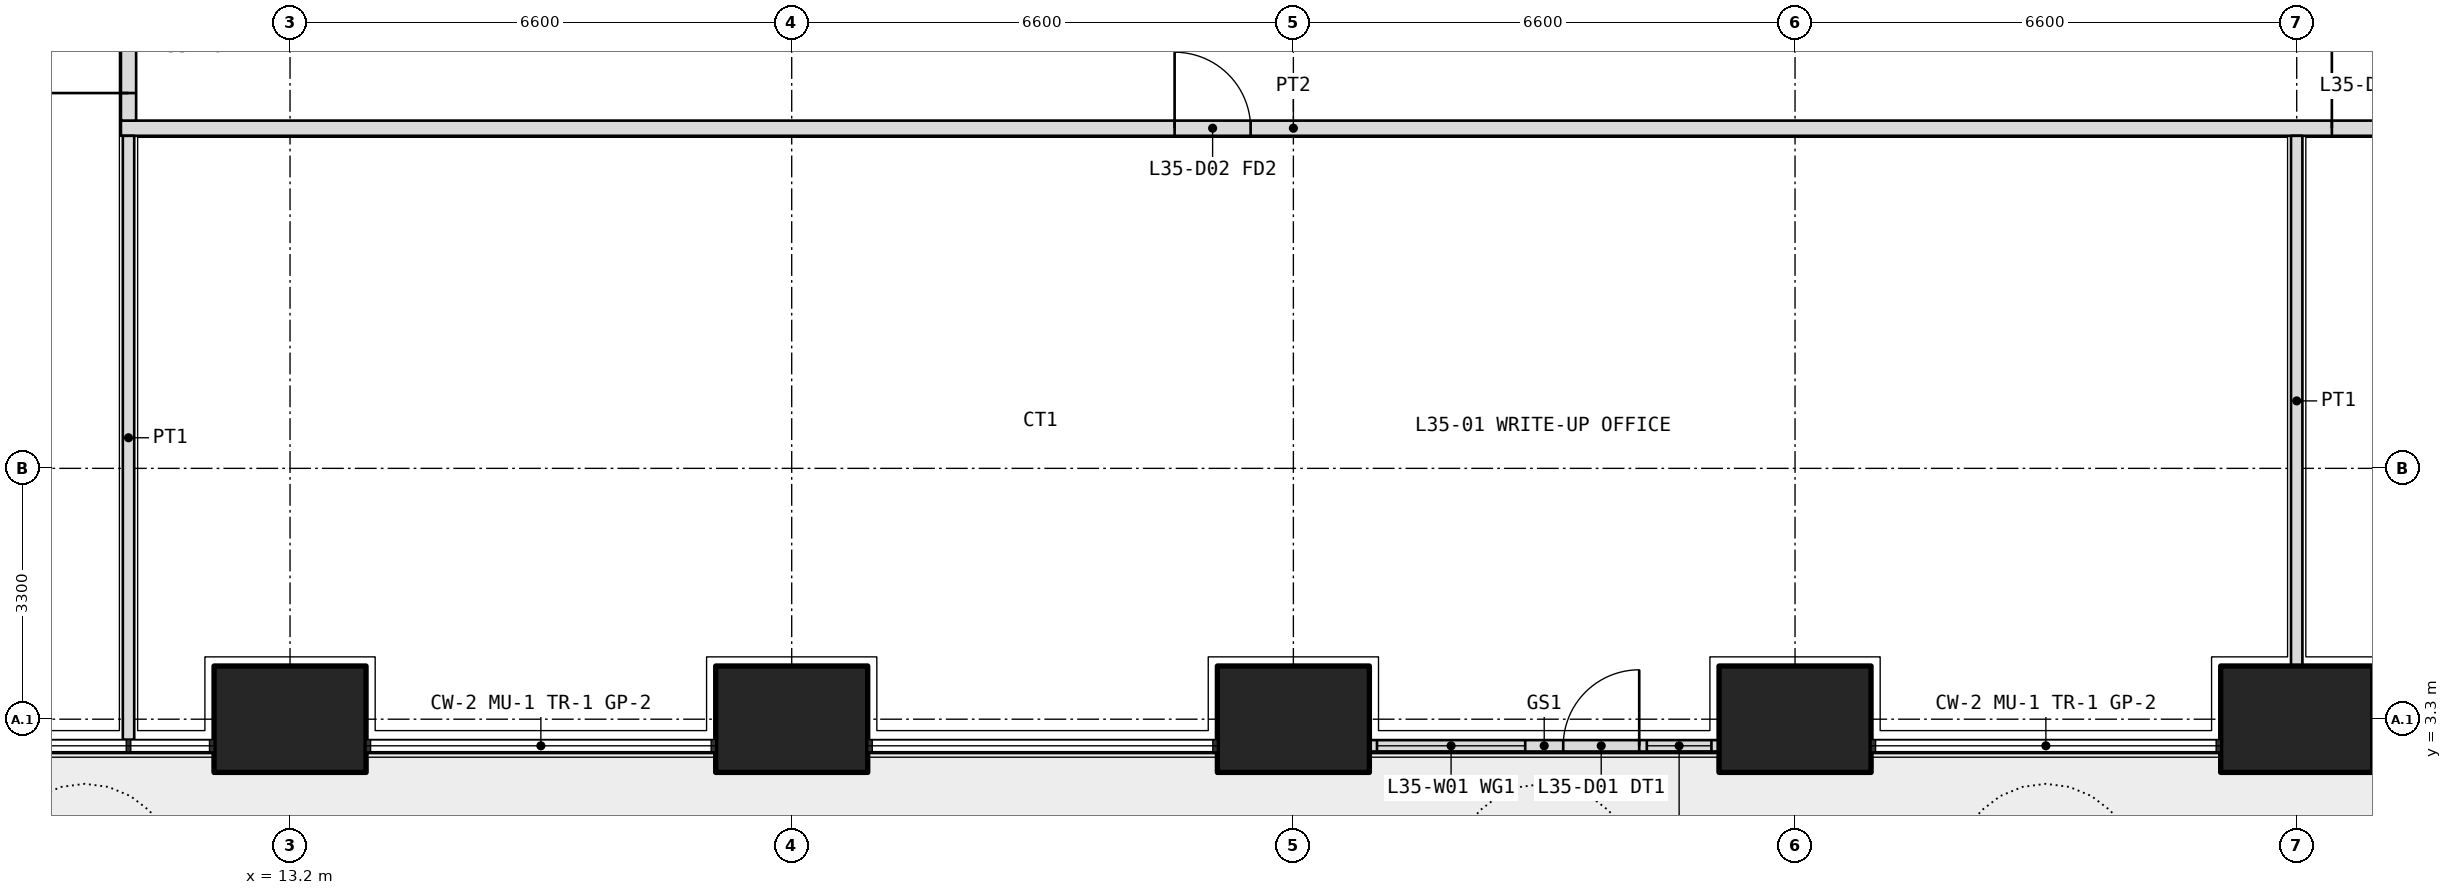
"""IFC4 building model, lengths in metres.
Left out: names, types, materials, properties, quantities, classifications, styles, units other than length and angle.
Written with IfcOpenShell. Run it as: python <this file> out.ifc"""

import sys

from ifc_helpers import new_model, si_unit, direction, frame, frame_2d, origin, origin_2d, place, context, subcontext, project, spatial, rectangle, extrude, element, fill, save


model = new_model("IFC4")
c1 = context("Model", 3, precision=1e-05, world=origin(), true_north=direction((0.0, 1.0)))
c2 = subcontext(c1, "Body", "Model", "MODEL_VIEW")
j1 = project(units=[si_unit("LENGTHUNIT", "METRE"), si_unit("PLANEANGLEUNIT", "RADIAN")], contexts=[c1])
p1 = place(None, origin())
s1 = spatial("IfcSite", under=j1, at=p1, CompositionType="ELEMENT")
p2 = place(p1, origin())
s2 = spatial("IfcBuilding", under=s1, at=p2, CompositionType="ELEMENT")
p3 = place(p2, frame((0.0, 0.0, 155.7)))
s3 = spatial("IfcBuildingStorey", under=s2, at=p3, CompositionType="ELEMENT", Elevation=155.7)
for number, where, z_axis, x_axis in (
    (1, (13.2, 3.3, 0.0), (0.0, 0.0, 1.0), (1.0, 0.0, 0.0)),
    (2, (19.8, 3.3, 0.0), (0.0, 0.0, 1.0), (1.0, 0.0, 0.0)),
    (3, (26.4, 3.3, 0.0), (0.0, 0.0, 1.0), (1.0, 0.0, 0.0)),
    (4, (33.0, 3.3, 0.0), (0.0, 0.0, 1.0), (1.0, 0.0, 0.0)),
    (5, (39.6, 3.3, 0.0), (0.0, 0.0, 1.0), (1.0, 0.0, 0.0)),
):
    element("IfcColumn", number, at=place(p3, frame(where, z_axis=z_axis, x_axis=x_axis)), inside=s3, PredefinedType="COLUMN", context=c2, shape_type="SweptSolid", body=[
        extrude(rectangle(XDim=2.0, YDim=1.4, at=origin_2d()), origin(), (0.0, 0.0, 1.0), 4.2),
    ])
p4 = place(p3, frame((27.4, 2.95, 0.0), z_axis=(0.0, 0.0, 1.0), x_axis=(1.0, 0.0, 0.0)))
e6 = element("IfcWall", 6, at=p4, inside=s3, PredefinedType="SOLIDWALL", context=c2, shape_type="SweptSolid", body=[
    extrude(rectangle(XDim=4.6, YDim=0.15, at=frame_2d((2.3, 0.0))), origin(), (0.0, 0.0, 1.0), 2.7),
])
p5 = place(p4, frame((2.55, 0.0, 0.0)))
e7 = element("IfcOpeningElement", 7, at=p5, cuts=e6, PredefinedType="OPENING", context=c2, shape_type="SweptSolid", body=[
    extrude(rectangle(XDim=1.0, YDim=2.4, at=frame_2d((0.5, 1.2))), frame((0.0, 0.085, 0.0), z_axis=(0.0, -1.0, 0.0), x_axis=(1.0, 0.0, 0.0)), (0.0, 0.0, 1.0), 0.17),
])
p6 = place(p4, frame((0.1, 0.0, 0.1)))
e8 = element("IfcOpeningElement", 8, at=p6, cuts=e6, PredefinedType="OPENING", context=c2, shape_type="SweptSolid", body=[
    extrude(rectangle(XDim=1.95, YDim=2.3, at=frame_2d((0.975, 1.15))), frame((0.0, 0.085, 0.0), z_axis=(0.0, -1.0, 0.0), x_axis=(1.0, 0.0, 0.0)), (0.0, 0.0, 1.0), 0.17),
])
p7 = place(p4, frame((3.65, 0.0, 0.1)))
e9 = element("IfcOpeningElement", 9, at=p7, cuts=e6, PredefinedType="OPENING", context=c2, shape_type="SweptSolid", body=[
    extrude(rectangle(XDim=0.85, YDim=2.3, at=frame_2d((0.425, 1.15))), frame((0.0, 0.085, 0.0), z_axis=(0.0, -1.0, 0.0), x_axis=(1.0, 0.0, 0.0)), (0.0, 0.0, 1.0), 0.17),
])
p8 = place(p3, frame((10.975, 11.075, 0.0), z_axis=(0.0, 0.0, 1.0), x_axis=(1.0, 0.0, 0.0)))
e10 = element("IfcWall", 10, at=p8, inside=s3, PredefinedType="PARTITIONING", context=c2, shape_type="SweptSolid", body=[
    extrude(rectangle(XDim=30.85, YDim=0.2, at=frame_2d((15.425, 0.0))), origin(), (0.0, 0.0, 1.0), 2.85),
])
p9 = place(p8, frame((13.863, 0.0, 0.0)))
e11 = element("IfcOpeningElement", 11, at=p9, cuts=e10, PredefinedType="OPENING", context=c2, shape_type="SweptSolid", body=[
    extrude(rectangle(XDim=1.0, YDim=2.1, at=frame_2d((0.5, 1.05))), frame((0.0, 0.11, 0.0), z_axis=(0.0, -1.0, 0.0), x_axis=(1.0, 0.0, 0.0)), (0.0, 0.0, 1.0), 0.22),
])
p10 = place(p8, frame((29.087, 0.0, 0.0)))
e12 = element("IfcOpeningElement", 12, at=p10, cuts=e10, PredefinedType="OPENING", context=c2, shape_type="SweptSolid", body=[
    extrude(rectangle(XDim=1.2, YDim=2.1, at=frame_2d((0.6, 1.05))), frame((0.0, 0.11, 0.0), z_axis=(0.0, -1.0, 0.0), x_axis=(1.0, 0.0, 0.0)), (0.0, 0.0, 1.0), 0.22),
])
p11 = place(p3, frame((11.075, 11.175, 0.0), z_axis=(0.0, 0.0, 1.0), x_axis=(0.0, 1.0, 0.0)))
e13 = element("IfcWall", 13, at=p11, inside=s3, PredefinedType="PARTITIONING", context=c2, shape_type="SweptSolid", body=[
    extrude(rectangle(XDim=15.225, YDim=0.2, at=frame_2d((7.612, 0.0))), origin(), (0.0, 0.0, 1.0), 2.85),
])
p12 = place(p11, frame((0.363, 0.0, 0.0)))
e14 = element("IfcOpeningElement", 14, at=p12, cuts=e13, PredefinedType="OPENING", context=c2, shape_type="SweptSolid", body=[
    extrude(rectangle(XDim=1.2, YDim=2.1, at=frame_2d((0.6, 1.05))), frame((0.0, 0.11, 0.0), z_axis=(0.0, -1.0, 0.0), x_axis=(1.0, 0.0, 0.0)), (0.0, 0.0, 1.0), 0.22),
])
p13 = place(p11, frame((2.575, 0.0, 0.0)))
e15 = element("IfcOpeningElement", 15, at=p13, cuts=e13, PredefinedType="OPENING", context=c2, shape_type="SweptSolid", body=[
    extrude(rectangle(XDim=1.0, YDim=2.1, at=frame_2d((0.5, 1.05))), frame((0.0, 0.11, 0.0), z_axis=(0.0, -1.0, 0.0), x_axis=(1.0, 0.0, 0.0)), (0.0, 0.0, 1.0), 0.22),
])
p14 = place(p11, frame((5.625, 0.0, 0.0)))
e16 = element("IfcOpeningElement", 16, at=p14, cuts=e13, PredefinedType="OPENING", context=c2, shape_type="SweptSolid", body=[
    extrude(rectangle(XDim=0.9, YDim=2.1, at=frame_2d((0.45, 1.05))), frame((0.0, 0.11, 0.0), z_axis=(0.0, -1.0, 0.0), x_axis=(1.0, 0.0, 0.0)), (0.0, 0.0, 1.0), 0.22),
])
p15 = place(p11, frame((9.425, 0.0, 0.0)))
e17 = element("IfcOpeningElement", 17, at=p15, cuts=e13, PredefinedType="OPENING", context=c2, shape_type="SweptSolid", body=[
    extrude(rectangle(XDim=0.9, YDim=2.1, at=frame_2d((0.45, 1.05))), frame((0.0, 0.11, 0.0), z_axis=(0.0, -1.0, 0.0), x_axis=(1.0, 0.0, 0.0)), (0.0, 0.0, 1.0), 0.22),
])
p16 = place(p11, frame((12.975, 0.0, 0.0)))
e18 = element("IfcOpeningElement", 18, at=p16, cuts=e13, PredefinedType="OPENING", context=c2, shape_type="SweptSolid", body=[
    extrude(rectangle(XDim=1.0, YDim=2.1, at=frame_2d((0.5, 1.05))), frame((0.0, 0.11, 0.0), z_axis=(0.0, -1.0, 0.0), x_axis=(1.0, 0.0, 0.0)), (0.0, 0.0, 1.0), 0.22),
])
p17 = place(p3, frame((11.075, 3.03, 0.0), z_axis=(0.0, 0.0, 1.0), x_axis=(0.0, 1.0, 0.0)))
e19 = element("IfcWall", 19, at=p17, inside=s3, PredefinedType="PARTITIONING", context=c2, shape_type="SweptSolid", body=[
    extrude(rectangle(XDim=7.945, YDim=0.15, at=frame_2d((3.973, 0.0))), origin(), (0.0, 0.0, 1.0), 2.7),
])
p18 = place(p3, frame((39.6, 4.0, 0.0), z_axis=(0.0, 0.0, 1.0), x_axis=(0.0, 1.0, 0.0)))
e20 = element("IfcWall", 20, at=p18, inside=s3, PredefinedType="PARTITIONING", context=c2, shape_type="SweptSolid", body=[
    extrude(rectangle(XDim=6.975, YDim=0.15, at=frame_2d((3.488, 0.0))), origin(), (0.0, 0.0, 1.0), 2.85),
])
p19 = place(p5, origin())
e21 = element("IfcDoor", 21, at=p19, inside=s3, OperationType="SINGLE_SWING_RIGHT", PredefinedType="DOOR", context=c2, shape_type="SweptSolid", body=[
    extrude(rectangle(XDim=1.0, YDim=2.4, at=frame_2d((0.5, 1.2))), frame((0.0, 0.025, 0.0), z_axis=(0.0, -1.0, 0.0), x_axis=(1.0, 0.0, 0.0)), (0.0, 0.0, 1.0), 0.05),
])
fill(e7, e21)
p20 = place(p6, origin())
e22 = element("IfcWindow", 22, at=p20, inside=s3, PartitioningType="SINGLE_PANEL", PredefinedType="WINDOW", context=c2, shape_type="SweptSolid", body=[
    extrude(rectangle(XDim=1.95, YDim=2.3, at=frame_2d((0.975, 1.15))), frame((0.0, 0.03, 0.0), z_axis=(0.0, -1.0, 0.0), x_axis=(1.0, 0.0, 0.0)), (0.0, 0.0, 1.0), 0.06),
])
fill(e8, e22)
p21 = place(p7, origin())
e23 = element("IfcWindow", 23, at=p21, inside=s3, PartitioningType="SINGLE_PANEL", PredefinedType="WINDOW", context=c2, shape_type="SweptSolid", body=[
    extrude(rectangle(XDim=0.85, YDim=2.3, at=frame_2d((0.425, 1.15))), frame((0.0, 0.03, 0.0), z_axis=(0.0, -1.0, 0.0), x_axis=(1.0, 0.0, 0.0)), (0.0, 0.0, 1.0), 0.06),
])
fill(e9, e23)
p22 = place(p9, origin())
e24 = element("IfcDoor", 24, at=p22, inside=s3, OperationType="SINGLE_SWING_LEFT", PredefinedType="DOOR", context=c2, shape_type="SweptSolid", body=[
    extrude(rectangle(XDim=1.0, YDim=2.1, at=frame_2d((0.5, 1.05))), frame((0.0, 0.025, 0.0), z_axis=(0.0, -1.0, 0.0), x_axis=(1.0, 0.0, 0.0)), (0.0, 0.0, 1.0), 0.05),
])
fill(e11, e24)
p23 = place(p10, origin())
e25 = element("IfcDoor", 25, at=p23, inside=s3, OperationType="DOUBLE_DOOR_SINGLE_SWING", PredefinedType="DOOR", context=c2, shape_type="SweptSolid", body=[
    extrude(rectangle(XDim=1.2, YDim=2.1, at=frame_2d((0.6, 1.05))), frame((0.0, 0.025, 0.0), z_axis=(0.0, -1.0, 0.0), x_axis=(1.0, 0.0, 0.0)), (0.0, 0.0, 1.0), 0.05),
])
fill(e12, e25)
p24 = place(p12, origin())
e26 = element("IfcDoor", 26, at=p24, inside=s3, OperationType="DOUBLE_DOOR_SINGLE_SWING", PredefinedType="DOOR", context=c2, shape_type="SweptSolid", body=[
    extrude(rectangle(XDim=1.2, YDim=2.1, at=frame_2d((0.6, 1.05))), frame((0.0, 0.025, 0.0), z_axis=(0.0, -1.0, 0.0), x_axis=(1.0, 0.0, 0.0)), (0.0, 0.0, 1.0), 0.05),
])
fill(e14, e26)
save(model, sys.argv[1])
